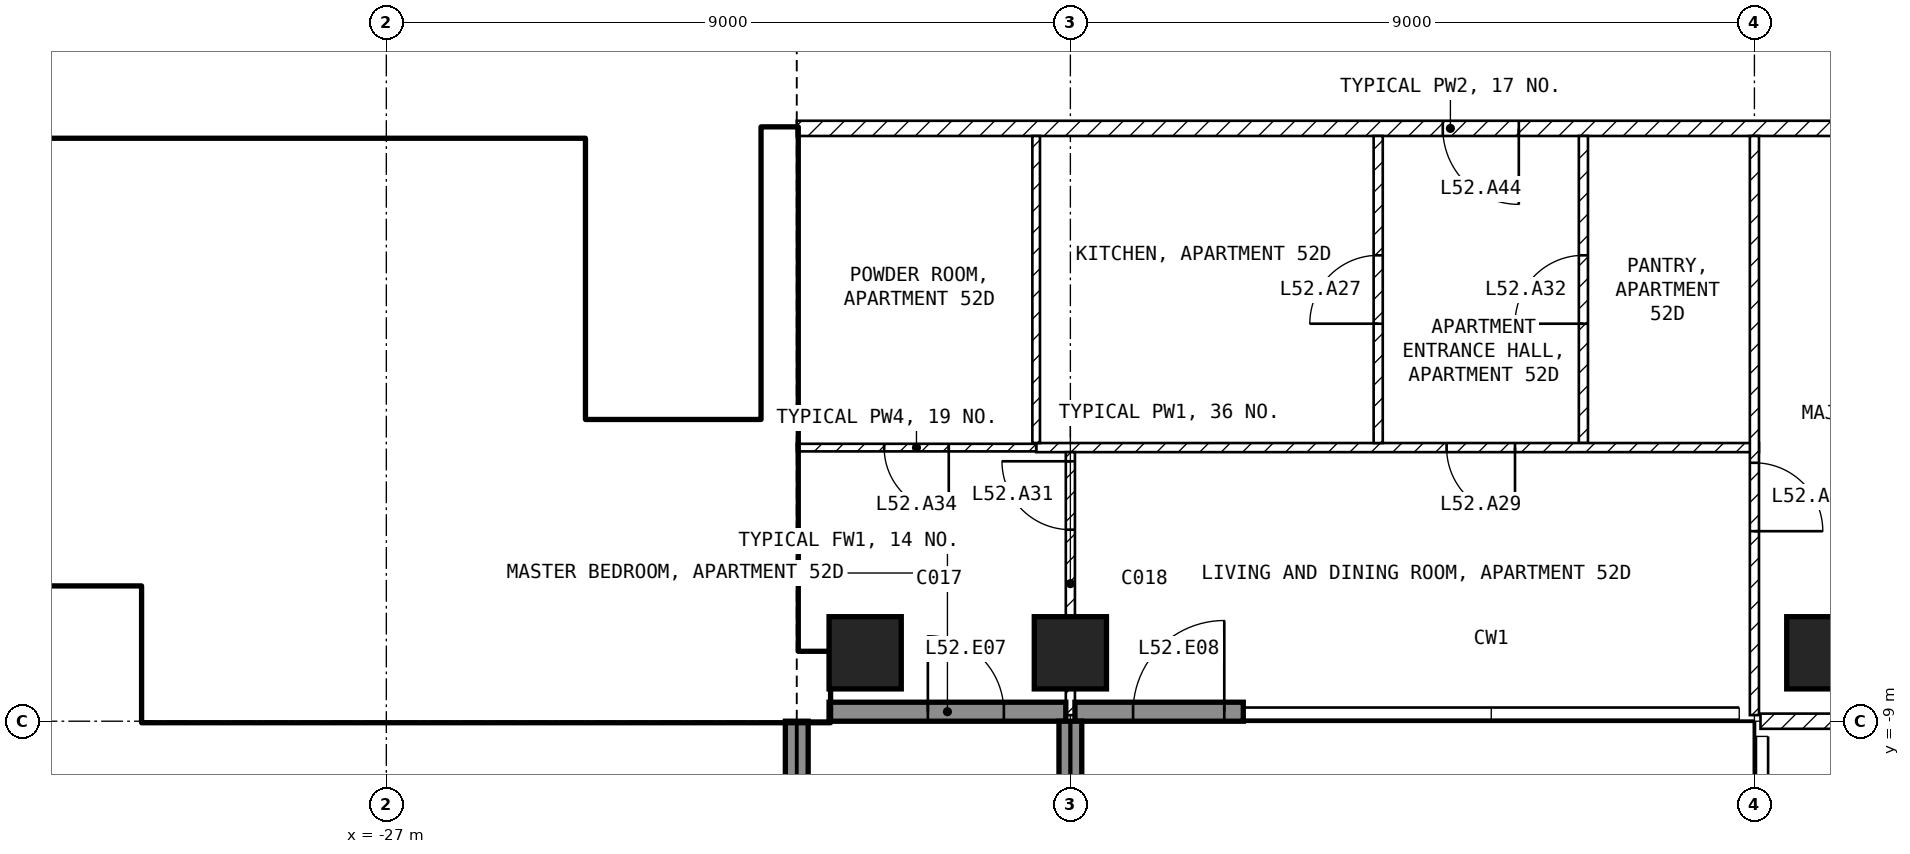
"""IFC4 building model, lengths in metres.
Left out: names, types, materials, properties, quantities, classifications, styles, units other than length and angle.
Written with IfcOpenShell. Run it as: python <this file> out.ifc"""

import sys

from ifc_helpers import new_model, si_unit, direction, frame, frame_2d, origin, origin_2d, place, context, subcontext, project, spatial, rectangle, extrude, element, fill, save


model = new_model("IFC4")
c1 = context("Model", 3, precision=1e-05, world=origin(), true_north=direction((0.0, 1.0)))
c2 = subcontext(c1, "Body", "Model", "MODEL_VIEW")
j1 = project(units=[si_unit("LENGTHUNIT", "METRE"), si_unit("PLANEANGLEUNIT", "RADIAN")], contexts=[c1])
p1 = place(None, origin())
s1 = spatial("IfcSite", under=j1, at=p1, CompositionType="ELEMENT")
p2 = place(p1, origin())
s2 = spatial("IfcBuilding", under=s1, at=p2, CompositionType="ELEMENT")
p3 = place(p2, frame((0.0, 0.0, 208.6)))
s3 = spatial("IfcBuildingStorey", under=s2, at=p3, CompositionType="ELEMENT", Elevation=208.6)
for number, where, z_axis, x_axis in (
    (1, (-20.7, -8.1, -0.25), (0.0, 0.0, 1.0), (1.0, 0.0, 0.0)),
    (2, (-18.0, -8.1, -0.25), (0.0, 0.0, 1.0), (1.0, 0.0, 0.0)),
    (3, (-8.1, -8.1, -0.25), (0.0, 0.0, 1.0), (1.0, 0.0, 0.0)),
):
    element("IfcColumn", number, at=place(p3, frame(where, z_axis=z_axis, x_axis=x_axis)), inside=s3, PredefinedType="COLUMN", context=c2, shape_type="SweptSolid", body=[
        extrude(rectangle(XDim=0.95, YDim=0.95, at=origin_2d()), origin(), (0.0, 0.0, 1.0), 3.5),
    ])
p4 = place(p3, frame((-21.175, -8.875, 0.0), z_axis=(0.0, 0.0, 1.0), x_axis=(1.0, 0.0, 0.0)))
e4 = element("IfcWall", 4, at=p4, inside=s3, PredefinedType="SOLIDWALL", context=c2, shape_type="SweptSolid", body=[
    extrude(rectangle(XDim=3.115, YDim=0.25, at=frame_2d((1.558, 0.0))), origin(), (0.0, 0.0, 1.0), 3.25),
])
p5 = place(p4, frame((1.3, 0.0, 0.0)))
e5 = element("IfcOpeningElement", 5, at=p5, cuts=e4, PredefinedType="OPENING", context=c2, shape_type="SweptSolid", body=[
    extrude(rectangle(XDim=1.0, YDim=2.4, at=frame_2d((0.5, 1.2))), frame((0.0, 0.135, 0.0), z_axis=(0.0, -1.0, 0.0), x_axis=(1.0, 0.0, 0.0)), (0.0, 0.0, 1.0), 0.27),
])
p6 = place(p3, frame((-17.94, -8.875, 0.0), z_axis=(0.0, 0.0, 1.0), x_axis=(1.0, 0.0, 0.0)))
e6 = element("IfcWall", 6, at=p6, inside=s3, PredefinedType="SOLIDWALL", context=c2, shape_type="SweptSolid", body=[
    extrude(rectangle(XDim=2.215, YDim=0.25, at=frame_2d((1.107, 0.0))), origin(), (0.0, 0.0, 1.0), 3.25),
])
p7 = place(p6, frame((0.765, 0.0, 0.0)))
e7 = element("IfcOpeningElement", 7, at=p7, cuts=e6, PredefinedType="OPENING", context=c2, shape_type="SweptSolid", body=[
    extrude(rectangle(XDim=1.2, YDim=2.4, at=frame_2d((0.6, 1.2))), frame((0.0, 0.135, 0.0), z_axis=(0.0, -1.0, 0.0), x_axis=(1.0, 0.0, 0.0)), (0.0, 0.0, 1.0), 0.27),
])
for number, where, z_axis, x_axis in (
    (8, (-21.6, -9.0, 0.0), (0.0, 0.0, 1.0), (0.0, -1.0, 0.0)),
    (9, (-18.0, -9.0, 0.0), (0.0, 0.0, 1.0), (0.0, -1.0, 0.0)),
):
    element("IfcWall", number, at=place(p3, frame(where, z_axis=z_axis, x_axis=x_axis)), inside=s3, PredefinedType="SOLIDWALL", context=c2, shape_type="SweptSolid", body=[
        extrude(rectangle(XDim=2.7, YDim=0.3, at=frame_2d((1.35, 0.0))), origin(), (0.0, 0.0, 1.0), 3.25),
    ])
p8 = place(p3, frame((-30.2, -8.55, 0.0), z_axis=(0.0, 0.0, 1.0), x_axis=(1.0, 0.0, 0.0)))
e10 = element("IfcWall", 10, at=p8, inside=s3, PredefinedType="SHEAR", context=c2, shape_type="SweptSolid", body=[
    extrude(rectangle(XDim=9.025, YDim=0.9, at=frame_2d((4.512, 0.0))), origin(), (0.0, 0.0, 1.0), 3.25),
])
p9 = place(p3, frame((-29.9, -8.1, 0.0), z_axis=(0.0, 0.0, 1.0), x_axis=(0.0, 1.0, 0.0)))
e11 = element("IfcWall", 11, at=p9, inside=s3, PredefinedType="SHEAR", context=c2, shape_type="SweptSolid", body=[
    extrude(rectangle(XDim=1.5, YDim=0.6, at=frame_2d((0.75, 0.0))), origin(), (0.0, 0.0, 1.0), 3.25),
])
p10 = place(p3, frame((-32.0, -6.9, 0.0), z_axis=(0.0, 0.0, 1.0), x_axis=(1.0, 0.0, 0.0)))
e12 = element("IfcWall", 12, at=p10, inside=s3, PredefinedType="SHEAR", context=c2, shape_type="SweptSolid", body=[
    extrude(rectangle(XDim=1.8, YDim=0.6, at=frame_2d((0.9, 0.0))), origin(), (0.0, 0.0, 1.0), 3.25),
])
p11 = place(p3, frame((-21.825, -8.1, 0.0), z_axis=(0.0, 0.0, 1.0), x_axis=(0.0, 1.0, 0.0)))
e13 = element("IfcWall", 13, at=p11, inside=s3, PredefinedType="SHEAR", context=c2, shape_type="SweptSolid", body=[
    extrude(rectangle(XDim=6.9, YDim=0.45, at=frame_2d((3.45, 0.0))), origin(), (0.0, 0.0, 1.0), 3.25),
])
p12 = place(p3, frame((-24.5, -5.05, 0.0), z_axis=(0.0, 0.0, 1.0), x_axis=(0.0, 1.0, 0.0)))
e14 = element("IfcWall", 14, at=p12, inside=s3, PredefinedType="SOLIDWALL", context=c2, shape_type="SweptSolid", body=[
    extrude(rectangle(XDim=3.7, YDim=0.2, at=frame_2d((1.85, 0.0))), origin(), (0.0, 0.0, 1.0), 3.25),
])
p13 = place(p12, frame((0.1, 0.0, 0.0)))
e15 = element("IfcOpeningElement", 15, at=p13, cuts=e14, PredefinedType="OPENING", context=c2, shape_type="SweptSolid", body=[
    extrude(rectangle(XDim=0.8, YDim=2.1, at=frame_2d((0.4, 1.05))), frame((0.0, 0.11, 0.0), z_axis=(0.0, -1.0, 0.0), x_axis=(1.0, 0.0, 0.0)), (0.0, 0.0, 1.0), 0.22),
])
p14 = place(p3, frame((-28.35, -5.15, 0.0), z_axis=(0.0, 0.0, 1.0), x_axis=(1.0, 0.0, 0.0)))
e16 = element("IfcWall", 16, at=p14, inside=s3, PredefinedType="SOLIDWALL", context=c2, shape_type="SweptSolid", body=[
    extrude(rectangle(XDim=6.3, YDim=0.2, at=frame_2d((3.15, 0.0))), origin(), (0.0, 0.0, 1.0), 3.25),
])
p15 = place(p14, frame((5.1, 0.0, 0.0)))
e17 = element("IfcOpeningElement", 17, at=p15, cuts=e16, PredefinedType="OPENING", context=c2, shape_type="SweptSolid", body=[
    extrude(rectangle(XDim=1.0, YDim=2.1, at=frame_2d((0.5, 1.05))), frame((0.0, 0.11, 0.0), z_axis=(0.0, -1.0, 0.0), x_axis=(1.0, 0.0, 0.0)), (0.0, 0.0, 1.0), 0.22),
])
p16 = place(p3, frame((-28.25, -8.1, 0.0), z_axis=(0.0, 0.0, 1.0), x_axis=(0.0, 1.0, 0.0)))
e18 = element("IfcWall", 18, at=p16, inside=s3, PredefinedType="SOLIDWALL", context=c2, shape_type="SweptSolid", body=[
    extrude(rectangle(XDim=2.85, YDim=0.2, at=frame_2d((1.425, 0.0))), origin(), (0.0, 0.0, 1.0), 3.25),
])
p17 = place(p3, frame((-33.2, -1.45, 0.0), z_axis=(0.0, 0.0, 1.0), x_axis=(1.0, 0.0, 0.0)))
e19 = element("IfcWall", 19, at=p17, inside=s3, PredefinedType="SOLIDWALL", context=c2, shape_type="SweptSolid", body=[
    extrude(rectangle(XDim=8.6, YDim=0.2, at=frame_2d((4.3, 0.0))), origin(), (0.0, 0.0, 1.0), 3.25),
])
p18 = place(p17, frame((7.2, 0.0, 0.0)))
e20 = element("IfcOpeningElement", 20, at=p18, cuts=e19, PredefinedType="OPENING", context=c2, shape_type="SweptSolid", body=[
    extrude(rectangle(XDim=1.0, YDim=2.1, at=frame_2d((0.5, 1.05))), frame((0.0, 0.11, 0.0), z_axis=(0.0, -1.0, 0.0), x_axis=(1.0, 0.0, 0.0)), (0.0, 0.0, 1.0), 0.22),
])
p19 = place(p17, frame((5.2, 0.0, 0.0)))
e21 = element("IfcOpeningElement", 21, at=p19, cuts=e19, PredefinedType="OPENING", context=c2, shape_type="SweptSolid", body=[
    extrude(rectangle(XDim=1.0, YDim=2.1, at=frame_2d((0.5, 1.05))), frame((0.0, 0.11, 0.0), z_axis=(0.0, -1.0, 0.0), x_axis=(1.0, 0.0, 0.0)), (0.0, 0.0, 1.0), 0.22),
])
p20 = place(p17, frame((3.2, 0.0, 0.0)))
e22 = element("IfcOpeningElement", 22, at=p20, cuts=e19, PredefinedType="OPENING", context=c2, shape_type="SweptSolid", body=[
    extrude(rectangle(XDim=1.0, YDim=2.1, at=frame_2d((0.5, 1.05))), frame((0.0, 0.11, 0.0), z_axis=(0.0, -1.0, 0.0), x_axis=(1.0, 0.0, 0.0)), (0.0, 0.0, 1.0), 0.22),
])
p21 = place(p17, frame((0.85, 0.0, 0.0)))
e23 = element("IfcOpeningElement", 23, at=p21, cuts=e19, PredefinedType="OPENING", context=c2, shape_type="SweptSolid", body=[
    extrude(rectangle(XDim=0.9, YDim=2.1, at=frame_2d((0.45, 1.05))), frame((0.0, 0.11, 0.0), z_axis=(0.0, -1.0, 0.0), x_axis=(1.0, 0.0, 0.0)), (0.0, 0.0, 1.0), 0.22),
])
p22 = place(p3, frame((-33.2, -3.95, 0.0), z_axis=(0.0, 0.0, 1.0), x_axis=(1.0, 0.0, 0.0)))
e24 = element("IfcWall", 24, at=p22, inside=s3, PredefinedType="SOLIDWALL", context=c2, shape_type="SweptSolid", body=[
    extrude(rectangle(XDim=8.6, YDim=0.2, at=frame_2d((4.3, 0.0))), origin(), (0.0, 0.0, 1.0), 3.25),
])
for number, where, z_axis, x_axis in (
    (25, (-26.5, -3.85, 0.0), (0.0, 0.0, 1.0), (0.0, 1.0, 0.0)),
    (26, (-28.5, -3.85, 0.0), (0.0, 0.0, 1.0), (0.0, 1.0, 0.0)),
    (27, (-30.5, -3.85, 0.0), (0.0, 0.0, 1.0), (0.0, 1.0, 0.0)),
):
    element("IfcWall", number, at=place(p3, frame(where, z_axis=z_axis, x_axis=x_axis)), inside=s3, PredefinedType="SOLIDWALL", context=c2, shape_type="SweptSolid", body=[
        extrude(rectangle(XDim=2.3, YDim=0.2, at=frame_2d((1.15, 0.0))), origin(), (0.0, 0.0, 1.0), 3.25),
    ])
p23 = place(p3, frame((-4.4, -1.2, 0.0), z_axis=(0.0, 0.0, 1.0), x_axis=(-1.0, 0.0, 0.0)))
e28 = element("IfcWall", 28, at=p23, inside=s3, PredefinedType="PARTITIONING", context=c2, shape_type="SweptSolid", body=[
    extrude(rectangle(XDim=17.2, YDim=0.2, at=frame_2d((8.6, 0.0))), origin(), (0.0, 0.0, 1.0), 3.25),
])
p24 = place(p23, frame((7.7, 0.0, 0.0)))
e29 = element("IfcOpeningElement", 29, at=p24, cuts=e28, PredefinedType="OPENING", context=c2, shape_type="SweptSolid", body=[
    extrude(rectangle(XDim=1.0, YDim=2.1, at=frame_2d((0.5, 1.05))), frame((0.0, 0.11, 0.0), z_axis=(0.0, -1.0, 0.0), x_axis=(1.0, 0.0, 0.0)), (0.0, 0.0, 1.0), 0.22),
])
p25 = place(p3, frame((8.92, -9.0, 0.0), z_axis=(0.0, 0.0, 1.0), x_axis=(-1.0, 0.0, 0.0)))
e30 = element("IfcWall", 30, at=p25, inside=s3, PredefinedType="PARTITIONING", context=c2, shape_type="SweptSolid", body=[
    extrude(rectangle(XDim=17.84, YDim=0.2, at=frame_2d((8.92, 0.0))), origin(), (0.0, 0.0, 1.0), 3.25),
])
p26 = place(p25, frame((8.42, 0.0, 0.0)))
e31 = element("IfcOpeningElement", 31, at=p26, cuts=e30, PredefinedType="OPENING", context=c2, shape_type="SweptSolid", body=[
    extrude(rectangle(XDim=1.0, YDim=2.1, at=frame_2d((0.5, 1.05))), frame((0.0, 0.11, 0.0), z_axis=(0.0, -1.0, 0.0), x_axis=(1.0, 0.0, 0.0)), (0.0, 0.0, 1.0), 0.22),
])
p27 = place(p3, frame((-11.25, -5.34, 0.0), z_axis=(0.0, 0.0, 1.0), x_axis=(0.0, 1.0, 0.0)))
e32 = element("IfcWall", 32, at=p27, inside=s3, PredefinedType="PARTITIONING", context=c2, shape_type="SweptSolid", body=[
    extrude(rectangle(XDim=4.04, YDim=0.12, at=frame_2d((2.02, 0.0))), origin(), (0.0, 0.0, 1.0), 3.25),
])
p28 = place(p27, frame((1.57, 0.0, 0.0)))
e33 = element("IfcOpeningElement", 33, at=p28, cuts=e32, PredefinedType="OPENING", context=c2, shape_type="SweptSolid", body=[
    extrude(rectangle(XDim=0.9, YDim=2.1, at=frame_2d((0.45, 1.05))), frame((0.0, 0.07, 0.0), z_axis=(0.0, -1.0, 0.0), x_axis=(1.0, 0.0, 0.0)), (0.0, 0.0, 1.0), 0.14),
])
p29 = place(p3, frame((-8.94, -5.4, 0.0), z_axis=(0.0, 0.0, 1.0), x_axis=(-1.0, 0.0, 0.0)))
e34 = element("IfcWall", 34, at=p29, inside=s3, PredefinedType="PARTITIONING", context=c2, shape_type="SweptSolid", body=[
    extrude(rectangle(XDim=9.51, YDim=0.12, at=frame_2d((4.755, 0.0))), origin(), (0.0, 0.0, 1.0), 3.25),
])
p30 = place(p29, frame((3.21, 0.0, 0.0)))
e35 = element("IfcOpeningElement", 35, at=p30, cuts=e34, PredefinedType="OPENING", context=c2, shape_type="SweptSolid", body=[
    extrude(rectangle(XDim=0.9, YDim=2.1, at=frame_2d((0.45, 1.05))), frame((0.0, 0.07, 0.0), z_axis=(0.0, -1.0, 0.0), x_axis=(1.0, 0.0, 0.0)), (0.0, 0.0, 1.0), 0.14),
])
p31 = place(p3, frame((-9.0, -1.3, 0.0), z_axis=(0.0, 0.0, 1.0), x_axis=(0.0, -1.0, 0.0)))
e36 = element("IfcWall", 36, at=p31, inside=s3, PredefinedType="PARTITIONING", context=c2, shape_type="SweptSolid", body=[
    extrude(rectangle(XDim=7.62, YDim=0.12, at=frame_2d((3.81, 0.0))), origin(), (0.0, 0.0, 1.0), 3.25),
])
p32 = place(p31, frame((4.3, 0.0, 0.0)))
e37 = element("IfcOpeningElement", 37, at=p32, cuts=e36, PredefinedType="OPENING", context=c2, shape_type="SweptSolid", body=[
    extrude(rectangle(XDim=0.9, YDim=2.1, at=frame_2d((0.45, 1.05))), frame((0.0, 0.07, 0.0), z_axis=(0.0, -1.0, 0.0), x_axis=(1.0, 0.0, 0.0)), (0.0, 0.0, 1.0), 0.14),
])
p33 = place(p3, frame((-13.95, -5.34, 0.0), z_axis=(0.0, 0.0, 1.0), x_axis=(0.0, 1.0, 0.0)))
e38 = element("IfcWall", 38, at=p33, inside=s3, PredefinedType="PARTITIONING", context=c2, shape_type="SweptSolid", body=[
    extrude(rectangle(XDim=4.04, YDim=0.12, at=frame_2d((2.02, 0.0))), origin(), (0.0, 0.0, 1.0), 3.25),
])
p34 = place(p33, frame((1.57, 0.0, 0.0)))
e39 = element("IfcOpeningElement", 39, at=p34, cuts=e38, PredefinedType="OPENING", context=c2, shape_type="SweptSolid", body=[
    extrude(rectangle(XDim=0.9, YDim=2.1, at=frame_2d((0.45, 1.05))), frame((0.0, 0.07, 0.0), z_axis=(0.0, -1.0, 0.0), x_axis=(1.0, 0.0, 0.0)), (0.0, 0.0, 1.0), 0.14),
])
p35 = place(p3, frame((-18.45, -5.34, 0.0), z_axis=(0.0, 0.0, 1.0), x_axis=(0.0, 1.0, 0.0)))
e40 = element("IfcWall", 40, at=p35, inside=s3, PredefinedType="PARTITIONING", context=c2, shape_type="SweptSolid", body=[
    extrude(rectangle(XDim=4.04, YDim=0.1, at=frame_2d((2.02, 0.0))), origin(), (0.0, 0.0, 1.0), 3.25),
])
p36 = place(p3, frame((-18.45, -5.4, 0.0), z_axis=(0.0, 0.0, 1.0), x_axis=(-1.0, 0.0, 0.0)))
e41 = element("IfcWall", 41, at=p36, inside=s3, PredefinedType="PARTITIONING", context=c2, shape_type="SweptSolid", body=[
    extrude(rectangle(XDim=3.15, YDim=0.1, at=frame_2d((1.575, 0.0))), origin(), (0.0, 0.0, 1.0), 3.25),
])
p37 = place(p36, frame((1.15, 0.0, 0.0)))
e42 = element("IfcOpeningElement", 42, at=p37, cuts=e41, PredefinedType="OPENING", context=c2, shape_type="SweptSolid", body=[
    extrude(rectangle(XDim=0.85, YDim=2.1, at=frame_2d((0.425, 1.05))), frame((0.0, 0.06, 0.0), z_axis=(0.0, -1.0, 0.0), x_axis=(1.0, 0.0, 0.0)), (0.0, 0.0, 1.0), 0.12),
])
p38 = place(p3, frame((-18.0, -8.92, 0.0), z_axis=(0.0, 0.0, 1.0), x_axis=(0.0, 1.0, 0.0)))
e43 = element("IfcWall", 43, at=p38, inside=s3, PredefinedType="PARTITIONING", context=c2, shape_type="SweptSolid", body=[
    extrude(rectangle(XDim=3.46, YDim=0.12, at=frame_2d((1.73, 0.0))), origin(), (0.0, 0.0, 1.0), 2.48),
])
p39 = place(p38, frame((2.44, 0.0, 0.0)))
e44 = element("IfcOpeningElement", 44, at=p39, cuts=e43, PredefinedType="OPENING", context=c2, shape_type="SweptSolid", body=[
    extrude(rectangle(XDim=0.9, YDim=2.1, at=frame_2d((0.45, 1.05))), frame((0.0, 0.07, 0.0), z_axis=(0.0, -1.0, 0.0), x_axis=(1.0, 0.0, 0.0)), (0.0, 0.0, 1.0), 0.14),
])
p40 = place(p5, origin())
e45 = element("IfcDoor", 45, at=p40, inside=s3, OperationType="SINGLE_SWING_LEFT", PredefinedType="DOOR", context=c2, shape_type="SweptSolid", body=[
    extrude(rectangle(XDim=1.0, YDim=2.4, at=frame_2d((0.5, 1.2))), frame((0.0, 0.025, 0.0), z_axis=(0.0, -1.0, 0.0), x_axis=(1.0, 0.0, 0.0)), (0.0, 0.0, 1.0), 0.05),
])
fill(e5, e45)
p41 = place(p7, origin())
e46 = element("IfcDoor", 46, at=p41, inside=s3, OperationType="SINGLE_SWING_RIGHT", PredefinedType="DOOR", context=c2, shape_type="SweptSolid", body=[
    extrude(rectangle(XDim=1.2, YDim=2.4, at=frame_2d((0.6, 1.2))), frame((0.0, 0.025, 0.0), z_axis=(0.0, -1.0, 0.0), x_axis=(1.0, 0.0, 0.0)), (0.0, 0.0, 1.0), 0.05),
])
fill(e7, e46)
p42 = place(p18, origin())
e47 = element("IfcDoor", 47, at=p42, inside=s3, OperationType="DOUBLE_DOOR_SLIDING", PredefinedType="DOOR", context=c2, shape_type="SweptSolid", body=[
    extrude(rectangle(XDim=1.0, YDim=2.1, at=frame_2d((0.5, 1.05))), frame((0.0, 0.025, 0.0), z_axis=(0.0, -1.0, 0.0), x_axis=(1.0, 0.0, 0.0)), (0.0, 0.0, 1.0), 0.05),
])
fill(e20, e47)
p43 = place(p19, origin())
e48 = element("IfcDoor", 48, at=p43, inside=s3, OperationType="DOUBLE_DOOR_SLIDING", PredefinedType="DOOR", context=c2, shape_type="SweptSolid", body=[
    extrude(rectangle(XDim=1.0, YDim=2.1, at=frame_2d((0.5, 1.05))), frame((0.0, 0.025, 0.0), z_axis=(0.0, -1.0, 0.0), x_axis=(1.0, 0.0, 0.0)), (0.0, 0.0, 1.0), 0.05),
])
fill(e21, e48)
p44 = place(p20, origin())
e49 = element("IfcDoor", 49, at=p44, inside=s3, OperationType="DOUBLE_DOOR_SLIDING", PredefinedType="DOOR", context=c2, shape_type="SweptSolid", body=[
    extrude(rectangle(XDim=1.0, YDim=2.1, at=frame_2d((0.5, 1.05))), frame((0.0, 0.025, 0.0), z_axis=(0.0, -1.0, 0.0), x_axis=(1.0, 0.0, 0.0)), (0.0, 0.0, 1.0), 0.05),
])
fill(e22, e49)
p45 = place(p15, origin())
e50 = element("IfcDoor", 50, at=p45, inside=s3, OperationType="SINGLE_SWING_LEFT", PredefinedType="DOOR", context=c2, shape_type="SweptSolid", body=[
    extrude(rectangle(XDim=1.0, YDim=2.1, at=frame_2d((0.5, 1.05))), frame((0.0, 0.025, 0.0), z_axis=(0.0, -1.0, 0.0), x_axis=(1.0, 0.0, 0.0)), (0.0, 0.0, 1.0), 0.05),
])
fill(e17, e50)
p46 = place(p13, origin())
e51 = element("IfcDoor", 51, at=p46, inside=s3, OperationType="SINGLE_SWING_LEFT", PredefinedType="DOOR", context=c2, shape_type="SweptSolid", body=[
    extrude(rectangle(XDim=0.8, YDim=2.1, at=frame_2d((0.4, 1.05))), frame((0.0, 0.025, 0.0), z_axis=(0.0, -1.0, 0.0), x_axis=(1.0, 0.0, 0.0)), (0.0, 0.0, 1.0), 0.05),
])
fill(e15, e51)
p47 = place(p34, origin())
e52 = element("IfcDoor", 52, at=p47, inside=s3, OperationType="SINGLE_SWING_LEFT", PredefinedType="DOOR", context=c2, shape_type="SweptSolid", body=[
    extrude(rectangle(XDim=0.9, YDim=2.1, at=frame_2d((0.45, 1.05))), frame((0.0, 0.025, 0.0), z_axis=(0.0, -1.0, 0.0), x_axis=(1.0, 0.0, 0.0)), (0.0, 0.0, 1.0), 0.05),
])
fill(e39, e52)
p48 = place(p30, origin())
e53 = element("IfcDoor", 53, at=p48, inside=s3, OperationType="SINGLE_SWING_LEFT", PredefinedType="DOOR", context=c2, shape_type="SweptSolid", body=[
    extrude(rectangle(XDim=0.9, YDim=2.1, at=frame_2d((0.45, 1.05))), frame((0.0, 0.025, 0.0), z_axis=(0.0, -1.0, 0.0), x_axis=(1.0, 0.0, 0.0)), (0.0, 0.0, 1.0), 0.05),
])
fill(e35, e53)
p49 = place(p32, origin())
e54 = element("IfcDoor", 54, at=p49, inside=s3, OperationType="SINGLE_SWING_RIGHT", PredefinedType="DOOR", context=c2, shape_type="SweptSolid", body=[
    extrude(rectangle(XDim=0.9, YDim=2.1, at=frame_2d((0.45, 1.05))), frame((0.0, 0.025, 0.0), z_axis=(0.0, -1.0, 0.0), x_axis=(1.0, 0.0, 0.0)), (0.0, 0.0, 1.0), 0.05),
])
fill(e37, e54)
p50 = place(p39, origin())
e55 = element("IfcDoor", 55, at=p50, inside=s3, OperationType="SINGLE_SWING_RIGHT", PredefinedType="DOOR", context=c2, shape_type="SweptSolid", body=[
    extrude(rectangle(XDim=0.9, YDim=2.1, at=frame_2d((0.45, 1.05))), frame((0.0, 0.025, 0.0), z_axis=(0.0, -1.0, 0.0), x_axis=(1.0, 0.0, 0.0)), (0.0, 0.0, 1.0), 0.05),
])
fill(e44, e55)
p51 = place(p28, origin())
e56 = element("IfcDoor", 56, at=p51, inside=s3, OperationType="SINGLE_SWING_LEFT", PredefinedType="DOOR", context=c2, shape_type="SweptSolid", body=[
    extrude(rectangle(XDim=0.9, YDim=2.1, at=frame_2d((0.45, 1.05))), frame((0.0, 0.025, 0.0), z_axis=(0.0, -1.0, 0.0), x_axis=(1.0, 0.0, 0.0)), (0.0, 0.0, 1.0), 0.05),
])
fill(e33, e56)
p52 = place(p37, origin())
e57 = element("IfcDoor", 57, at=p52, inside=s3, OperationType="SINGLE_SWING_LEFT", PredefinedType="DOOR", context=c2, shape_type="SweptSolid", body=[
    extrude(rectangle(XDim=0.85, YDim=2.1, at=frame_2d((0.425, 1.05))), frame((0.0, 0.025, 0.0), z_axis=(0.0, -1.0, 0.0), x_axis=(1.0, 0.0, 0.0)), (0.0, 0.0, 1.0), 0.05),
])
fill(e42, e57)
p53 = place(p24, origin())
e58 = element("IfcDoor", 58, at=p53, inside=s3, OperationType="SINGLE_SWING_LEFT", PredefinedType="DOOR", context=c2, shape_type="SweptSolid", body=[
    extrude(rectangle(XDim=1.0, YDim=2.1, at=frame_2d((0.5, 1.05))), frame((0.0, 0.025, 0.0), z_axis=(0.0, -1.0, 0.0), x_axis=(1.0, 0.0, 0.0)), (0.0, 0.0, 1.0), 0.05),
])
fill(e29, e58)
save(model, sys.argv[1])
